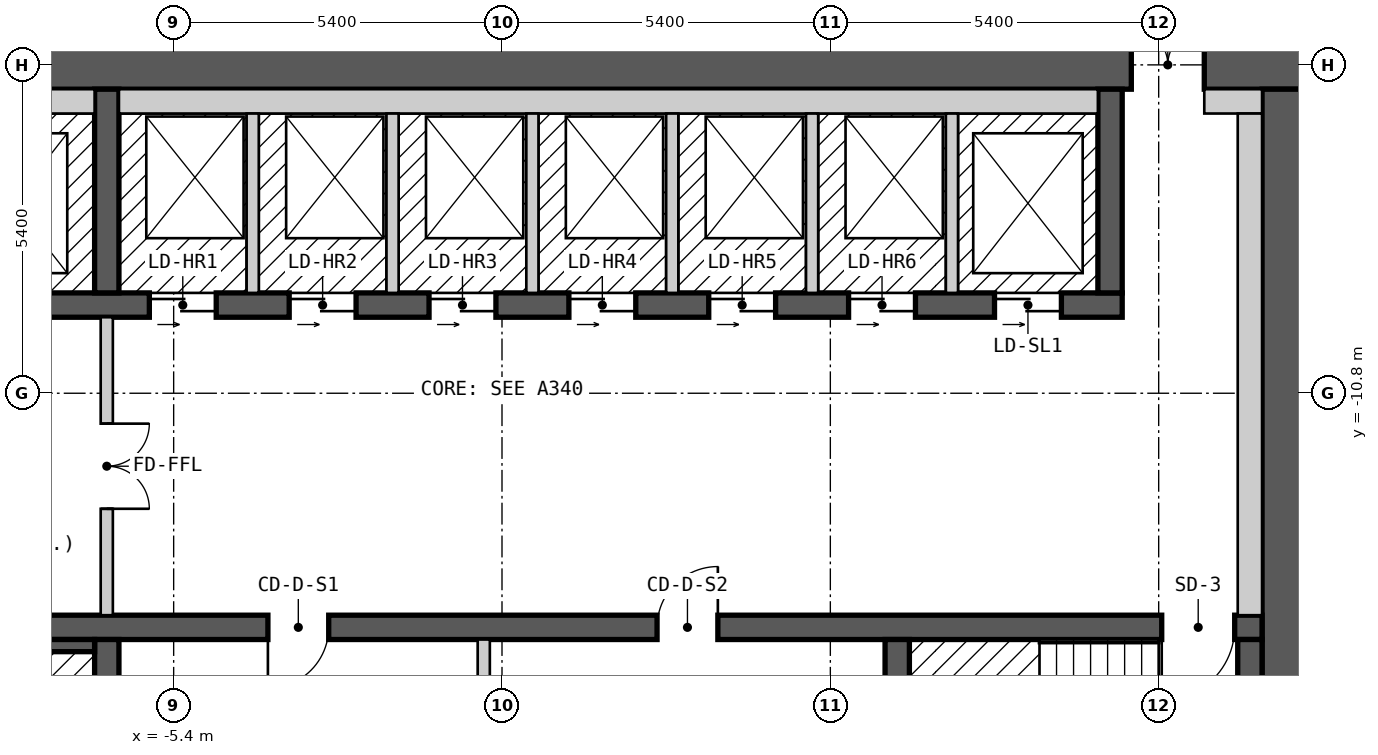
"""IFC4 building model, lengths in metres.
Left out: names, types, materials, properties, quantities, classifications, styles, units other than length and angle.
Written with IfcOpenShell. Run it as: python <this file> out.ifc"""

import sys

from ifc_helpers import new_model, si_unit, direction, frame, frame_2d, origin, place, context, subcontext, project, spatial, rectangle, extrude, element, fill, save


model = new_model("IFC4")
c1 = context("Model", 3, precision=1e-05, world=origin(), true_north=direction((0.0, 1.0)))
c2 = subcontext(c1, "Body", "Model", "MODEL_VIEW")
j1 = project(units=[si_unit("LENGTHUNIT", "METRE"), si_unit("PLANEANGLEUNIT", "RADIAN")], contexts=[c1])
p1 = place(None, origin())
s1 = spatial("IfcSite", under=j1, at=p1, CompositionType="ELEMENT")
p2 = place(p1, origin())
s2 = spatial("IfcBuilding", under=s1, at=p2, CompositionType="ELEMENT")
p3 = place(p2, frame((0.0, 0.0, 147.6)))
s3 = spatial("IfcBuildingStorey", under=s2, at=p3, CompositionType="ELEMENT", Elevation=147.6)
p4 = place(p3, frame((-13.3, -5.4, 0.0), z_axis=(0.0, 0.0, 1.0), x_axis=(1.0, 0.0, 0.0)))
e1 = element("IfcWall", 1, at=p4, inside=s3, PredefinedType="SHEAR", context=c2, shape_type="SweptSolid", body=[
    extrude(rectangle(XDim=26.6, YDim=0.8, at=frame_2d((13.3, 0.0))), origin(), (0.0, 0.0, 1.0), 2.7),
])
p5 = place(p4, frame((23.65, 0.0, 0.0)))
e2 = element("IfcOpeningElement", 2, at=p5, cuts=e1, PredefinedType="OPENING", context=c2, shape_type="SweptSolid", body=[
    extrude(rectangle(XDim=1.2, YDim=2.1, at=frame_2d((0.6, 1.05))), frame((0.0, 0.41, 0.0), z_axis=(0.0, -1.0, 0.0), x_axis=(1.0, 0.0, 0.0)), (0.0, 0.0, 1.0), 0.82),
])
p6 = place(p3, frame((12.9, -18.2, 0.0), z_axis=(0.0, 0.0, 1.0), x_axis=(0.0, 1.0, 0.0)))
e3 = element("IfcWall", 3, at=p6, inside=s3, PredefinedType="SHEAR", context=c2, shape_type="SweptSolid", body=[
    extrude(rectangle(XDim=12.4, YDim=0.8, at=frame_2d((6.2, 0.0))), origin(), (0.0, 0.0, 1.0), 2.7),
])
p7 = place(p3, frame((-12.5, -14.65, 0.0), z_axis=(0.0, 0.0, 1.0), x_axis=(1.0, 0.0, 0.0)))
e4 = element("IfcWall", 4, at=p7, inside=s3, PredefinedType="SHEAR", context=c2, shape_type="SweptSolid", body=[
    extrude(rectangle(XDim=25.0, YDim=0.4, at=frame_2d((12.5, 0.0))), origin(), (0.0, 0.0, 1.0), 2.7),
])
p8 = place(p7, frame((1.7, 0.0, 0.0), z_axis=(0.0, 0.0, 1.0), x_axis=(-1.0, 0.0, 0.0)))
e5 = element("IfcOpeningElement", 5, at=p8, cuts=e4, PredefinedType="OPENING", context=c2, shape_type="SweptSolid", body=[
    extrude(rectangle(XDim=1.2, YDim=2.1, at=frame_2d((0.6, 1.05))), frame((0.0, 0.21, 0.0), z_axis=(0.0, -1.0, 0.0), x_axis=(1.0, 0.0, 0.0)), (0.0, 0.0, 1.0), 0.42),
])
p9 = place(p7, frame((24.55, 0.0, 0.0), z_axis=(0.0, 0.0, 1.0), x_axis=(-1.0, 0.0, 0.0)))
e6 = element("IfcOpeningElement", 6, at=p9, cuts=e4, PredefinedType="OPENING", context=c2, shape_type="SweptSolid", body=[
    extrude(rectangle(XDim=1.2, YDim=2.1, at=frame_2d((0.6, 1.05))), frame((0.0, 0.21, 0.0), z_axis=(0.0, -1.0, 0.0), x_axis=(1.0, 0.0, 0.0)), (0.0, 0.0, 1.0), 0.42),
])
p10 = place(p7, frame((9.65, 0.0, 0.0), z_axis=(0.0, 0.0, 1.0), x_axis=(-1.0, 0.0, 0.0)))
e7 = element("IfcOpeningElement", 7, at=p10, cuts=e4, PredefinedType="OPENING", context=c2, shape_type="SweptSolid", body=[
    extrude(rectangle(XDim=1.0, YDim=2.1, at=frame_2d((0.5, 1.05))), frame((0.0, 0.21, 0.0), z_axis=(0.0, -1.0, 0.0), x_axis=(1.0, 0.0, 0.0)), (0.0, 0.0, 1.0), 0.42),
])
p11 = place(p7, frame((16.05, 0.0, 0.0), z_axis=(0.0, 0.0, 1.0), x_axis=(-1.0, 0.0, 0.0)))
e8 = element("IfcOpeningElement", 8, at=p11, cuts=e4, PredefinedType="OPENING", context=c2, shape_type="SweptSolid", body=[
    extrude(rectangle(XDim=1.0, YDim=2.1, at=frame_2d((0.5, 1.05))), frame((0.0, 0.21, 0.0), z_axis=(0.0, -1.0, 0.0), x_axis=(1.0, 0.0, 0.0)), (0.0, 0.0, 1.0), 0.42),
])
p12 = place(p3, frame((-12.5, -9.35, 0.0), z_axis=(0.0, 0.0, 1.0), x_axis=(1.0, 0.0, 0.0)))
e9 = element("IfcWall", 9, at=p12, inside=s3, PredefinedType="SHEAR", context=c2, shape_type="SweptSolid", body=[
    extrude(rectangle(XDim=22.7, YDim=0.4, at=frame_2d((11.35, 0.0))), origin(), (0.0, 0.0, 1.0), 2.7),
])
p13 = place(p12, frame((1.1, 0.0, 0.0)))
e10 = element("IfcOpeningElement", 10, at=p13, cuts=e9, PredefinedType="OPENING", context=c2, shape_type="SweptSolid", body=[
    extrude(rectangle(XDim=1.1, YDim=2.1, at=frame_2d((0.55, 1.05))), frame((0.0, 0.21, 0.0), z_axis=(0.0, -1.0, 0.0), x_axis=(1.0, 0.0, 0.0)), (0.0, 0.0, 1.0), 0.42),
])
p14 = place(p12, frame((3.9, 0.0, 0.0)))
e11 = element("IfcOpeningElement", 11, at=p14, cuts=e9, PredefinedType="OPENING", context=c2, shape_type="SweptSolid", body=[
    extrude(rectangle(XDim=1.1, YDim=2.1, at=frame_2d((0.55, 1.05))), frame((0.0, 0.21, 0.0), z_axis=(0.0, -1.0, 0.0), x_axis=(1.0, 0.0, 0.0)), (0.0, 0.0, 1.0), 0.42),
])
p15 = place(p12, frame((6.7, 0.0, 0.0)))
e12 = element("IfcOpeningElement", 12, at=p15, cuts=e9, PredefinedType="OPENING", context=c2, shape_type="SweptSolid", body=[
    extrude(rectangle(XDim=1.1, YDim=2.1, at=frame_2d((0.55, 1.05))), frame((0.0, 0.21, 0.0), z_axis=(0.0, -1.0, 0.0), x_axis=(1.0, 0.0, 0.0)), (0.0, 0.0, 1.0), 0.42),
])
p16 = place(p12, frame((9.0, 0.0, 0.0)))
e13 = element("IfcOpeningElement", 13, at=p16, cuts=e9, PredefinedType="OPENING", context=c2, shape_type="SweptSolid", body=[
    extrude(rectangle(XDim=1.1, YDim=2.1, at=frame_2d((0.55, 1.05))), frame((0.0, 0.21, 0.0), z_axis=(0.0, -1.0, 0.0), x_axis=(1.0, 0.0, 0.0)), (0.0, 0.0, 1.0), 0.42),
])
p17 = place(p12, frame((11.3, 0.0, 0.0)))
e14 = element("IfcOpeningElement", 14, at=p17, cuts=e9, PredefinedType="OPENING", context=c2, shape_type="SweptSolid", body=[
    extrude(rectangle(XDim=1.1, YDim=2.1, at=frame_2d((0.55, 1.05))), frame((0.0, 0.21, 0.0), z_axis=(0.0, -1.0, 0.0), x_axis=(1.0, 0.0, 0.0)), (0.0, 0.0, 1.0), 0.42),
])
p18 = place(p12, frame((13.6, 0.0, 0.0)))
e15 = element("IfcOpeningElement", 15, at=p18, cuts=e9, PredefinedType="OPENING", context=c2, shape_type="SweptSolid", body=[
    extrude(rectangle(XDim=1.1, YDim=2.1, at=frame_2d((0.55, 1.05))), frame((0.0, 0.21, 0.0), z_axis=(0.0, -1.0, 0.0), x_axis=(1.0, 0.0, 0.0)), (0.0, 0.0, 1.0), 0.42),
])
p19 = place(p12, frame((15.9, 0.0, 0.0)))
e16 = element("IfcOpeningElement", 16, at=p19, cuts=e9, PredefinedType="OPENING", context=c2, shape_type="SweptSolid", body=[
    extrude(rectangle(XDim=1.1, YDim=2.1, at=frame_2d((0.55, 1.05))), frame((0.0, 0.21, 0.0), z_axis=(0.0, -1.0, 0.0), x_axis=(1.0, 0.0, 0.0)), (0.0, 0.0, 1.0), 0.42),
])
p20 = place(p12, frame((18.2, 0.0, 0.0)))
e17 = element("IfcOpeningElement", 17, at=p20, cuts=e9, PredefinedType="OPENING", context=c2, shape_type="SweptSolid", body=[
    extrude(rectangle(XDim=1.1, YDim=2.1, at=frame_2d((0.55, 1.05))), frame((0.0, 0.21, 0.0), z_axis=(0.0, -1.0, 0.0), x_axis=(1.0, 0.0, 0.0)), (0.0, 0.0, 1.0), 0.42),
])
p21 = place(p12, frame((20.6, 0.0, 0.0)))
e18 = element("IfcOpeningElement", 18, at=p21, cuts=e9, PredefinedType="OPENING", context=c2, shape_type="SweptSolid", body=[
    extrude(rectangle(XDim=1.1, YDim=2.1, at=frame_2d((0.55, 1.05))), frame((0.0, 0.21, 0.0), z_axis=(0.0, -1.0, 0.0), x_axis=(1.0, 0.0, 0.0)), (0.0, 0.0, 1.0), 0.42),
])
for number, where, z_axis, x_axis in (
    (19, (-6.5, -18.2, 0.0), (0.0, 0.0, 1.0), (0.0, 1.0, 0.0)),
    (20, (6.5, -18.2, 0.0), (0.0, 0.0, 1.0), (0.0, 1.0, 0.0)),
    (21, (-6.5, -9.15, 0.0), (0.0, 0.0, 1.0), (0.0, 1.0, 0.0)),
    (22, (10.0, -9.15, 0.0), (0.0, 0.0, 1.0), (0.0, 1.0, 0.0)),
):
    element("IfcWall", number, at=place(p3, frame(where, z_axis=z_axis, x_axis=x_axis)), inside=s3, PredefinedType="SHEAR", context=c2, shape_type="SweptSolid", body=[
        extrude(rectangle(XDim=3.35, YDim=0.4, at=frame_2d((1.675, 0.0))), origin(), (0.0, 0.0, 1.0), 2.7),
    ])
p22 = place(p3, frame((-12.1, -6.0, 0.0), z_axis=(0.0, 0.0, 1.0), x_axis=(1.0, 0.0, 0.0)))
e23 = element("IfcWall", 23, at=p22, inside=s3, PredefinedType="SOLIDWALL", context=c2, shape_type="SweptSolid", body=[
    extrude(rectangle(XDim=5.4, YDim=0.4, at=frame_2d((2.7, 0.0))), origin(), (0.0, 0.0, 1.0), 2.7),
])
p23 = place(p3, frame((-10.8, -14.95, 0.0), z_axis=(0.0, 0.0, 1.0), x_axis=(1.0, 0.0, 0.0)))
e24 = element("IfcWall", 24, at=p23, inside=s3, PredefinedType="SOLIDWALL", context=c2, shape_type="SweptSolid", body=[
    extrude(rectangle(XDim=4.1, YDim=0.2, at=frame_2d((2.05, 0.0))), origin(), (0.0, 0.0, 1.0), 2.7),
])
p24 = place(p3, frame((-6.5, -14.45, 0.0), z_axis=(0.0, 0.0, 1.0), x_axis=(0.0, 1.0, 0.0)))
e25 = element("IfcWall", 25, at=p24, inside=s3, PredefinedType="PARTITIONING", context=c2, shape_type="SweptSolid", body=[
    extrude(rectangle(XDim=4.9, YDim=0.2, at=frame_2d((2.45, 0.0))), origin(), (0.0, 0.0, 1.0), 2.7),
])
p25 = place(p24, frame((3.15, 0.0, 0.0), z_axis=(0.0, 0.0, 1.0), x_axis=(-1.0, 0.0, 0.0)))
e26 = element("IfcOpeningElement", 26, at=p25, cuts=e25, PredefinedType="OPENING", context=c2, shape_type="SweptSolid", body=[
    extrude(rectangle(XDim=1.4, YDim=2.1, at=frame_2d((0.7, 1.05))), frame((0.0, 0.11, 0.0), z_axis=(0.0, -1.0, 0.0), x_axis=(1.0, 0.0, 0.0)), (0.0, 0.0, 1.0), 0.22),
])
p26 = place(p3, frame((-6.3, -6.0, 0.0), z_axis=(0.0, 0.0, 1.0), x_axis=(1.0, 0.0, 0.0)))
e27 = element("IfcWall", 27, at=p26, inside=s3, PredefinedType="SOLIDWALL", context=c2, shape_type="SweptSolid", body=[
    extrude(rectangle(XDim=16.1, YDim=0.4, at=frame_2d((8.05, 0.0))), origin(), (0.0, 0.0, 1.0), 2.7),
])
for number, where, z_axis, x_axis in (
    (28, (-4.1, -9.15, 0.0), (0.0, 0.0, 1.0), (0.0, 1.0, 0.0)),
    (29, (-1.8, -9.15, 0.0), (0.0, 0.0, 1.0), (0.0, 1.0, 0.0)),
):
    element("IfcWall", number, at=place(p3, frame(where, z_axis=z_axis, x_axis=x_axis)), inside=s3, PredefinedType="SOLIDWALL", context=c2, shape_type="SweptSolid", body=[
        extrude(rectangle(XDim=2.95, YDim=0.2, at=frame_2d((1.475, 0.0))), origin(), (0.0, 0.0, 1.0), 2.7),
    ])
p27 = place(p3, frame((-0.3, -17.8, 0.0), z_axis=(0.0, 0.0, 1.0), x_axis=(0.0, 1.0, 0.0)))
e30 = element("IfcWall", 30, at=p27, inside=s3, PredefinedType="PARTITIONING", context=c2, shape_type="SweptSolid", body=[
    extrude(rectangle(XDim=2.95, YDim=0.2, at=frame_2d((1.475, 0.0))), origin(), (0.0, 0.0, 1.0), 2.7),
])
for number, where, z_axis, x_axis in (
    (31, (0.5, -9.15, 0.0), (0.0, 0.0, 1.0), (0.0, 1.0, 0.0)),
    (32, (2.8, -9.15, 0.0), (0.0, 0.0, 1.0), (0.0, 1.0, 0.0)),
    (33, (5.1, -9.15, 0.0), (0.0, 0.0, 1.0), (0.0, 1.0, 0.0)),
    (34, (7.4, -9.15, 0.0), (0.0, 0.0, 1.0), (0.0, 1.0, 0.0)),
):
    element("IfcWall", number, at=place(p3, frame(where, z_axis=z_axis, x_axis=x_axis)), inside=s3, PredefinedType="SOLIDWALL", context=c2, shape_type="SweptSolid", body=[
        extrude(rectangle(XDim=2.95, YDim=0.2, at=frame_2d((1.475, 0.0))), origin(), (0.0, 0.0, 1.0), 2.7),
    ])
p28 = place(p3, frame((11.55, -6.0, 0.0), z_axis=(0.0, 0.0, 1.0), x_axis=(1.0, 0.0, 0.0)))
e35 = element("IfcWall", 35, at=p28, inside=s3, PredefinedType="PARTITIONING", context=c2, shape_type="SweptSolid", body=[
    extrude(rectangle(XDim=0.95, YDim=0.4, at=frame_2d((0.475, 0.0))), origin(), (0.0, 0.0, 1.0), 2.7),
])
p29 = place(p3, frame((12.3, -17.6, 0.0), z_axis=(0.0, 0.0, 1.0), x_axis=(0.0, 1.0, 0.0)))
e36 = element("IfcWall", 36, at=p29, inside=s3, PredefinedType="SOLIDWALL", context=c2, shape_type="SweptSolid", body=[
    extrude(rectangle(XDim=2.75, YDim=0.4, at=frame_2d((1.375, 0.0))), origin(), (0.0, 0.0, 1.0), 2.7),
])
p30 = place(p3, frame((12.3, -14.45, 0.0), z_axis=(0.0, 0.0, 1.0), x_axis=(0.0, 1.0, 0.0)))
e37 = element("IfcWall", 37, at=p30, inside=s3, PredefinedType="PARTITIONING", context=c2, shape_type="SweptSolid", body=[
    extrude(rectangle(XDim=8.25, YDim=0.4, at=frame_2d((4.125, 0.0))), origin(), (0.0, 0.0, 1.0), 2.7),
])
p31 = place(p15, origin())
e38 = element("IfcDoor", 38, at=p31, inside=s3, OperationType="DOUBLE_DOOR_SLIDING", PredefinedType="DOOR", context=c2, shape_type="SweptSolid", body=[
    extrude(rectangle(XDim=1.1, YDim=2.1, at=frame_2d((0.55, 1.05))), frame((0.0, 0.025, 0.0), z_axis=(0.0, -1.0, 0.0), x_axis=(1.0, 0.0, 0.0)), (0.0, 0.0, 1.0), 0.05),
])
fill(e12, e38)
p32 = place(p16, origin())
e39 = element("IfcDoor", 39, at=p32, inside=s3, OperationType="DOUBLE_DOOR_SLIDING", PredefinedType="DOOR", context=c2, shape_type="SweptSolid", body=[
    extrude(rectangle(XDim=1.1, YDim=2.1, at=frame_2d((0.55, 1.05))), frame((0.0, 0.025, 0.0), z_axis=(0.0, -1.0, 0.0), x_axis=(1.0, 0.0, 0.0)), (0.0, 0.0, 1.0), 0.05),
])
fill(e13, e39)
p33 = place(p17, origin())
e40 = element("IfcDoor", 40, at=p33, inside=s3, OperationType="DOUBLE_DOOR_SLIDING", PredefinedType="DOOR", context=c2, shape_type="SweptSolid", body=[
    extrude(rectangle(XDim=1.1, YDim=2.1, at=frame_2d((0.55, 1.05))), frame((0.0, 0.025, 0.0), z_axis=(0.0, -1.0, 0.0), x_axis=(1.0, 0.0, 0.0)), (0.0, 0.0, 1.0), 0.05),
])
fill(e14, e40)
p34 = place(p18, origin())
e41 = element("IfcDoor", 41, at=p34, inside=s3, OperationType="DOUBLE_DOOR_SLIDING", PredefinedType="DOOR", context=c2, shape_type="SweptSolid", body=[
    extrude(rectangle(XDim=1.1, YDim=2.1, at=frame_2d((0.55, 1.05))), frame((0.0, 0.025, 0.0), z_axis=(0.0, -1.0, 0.0), x_axis=(1.0, 0.0, 0.0)), (0.0, 0.0, 1.0), 0.05),
])
fill(e15, e41)
p35 = place(p19, origin())
e42 = element("IfcDoor", 42, at=p35, inside=s3, OperationType="DOUBLE_DOOR_SLIDING", PredefinedType="DOOR", context=c2, shape_type="SweptSolid", body=[
    extrude(rectangle(XDim=1.1, YDim=2.1, at=frame_2d((0.55, 1.05))), frame((0.0, 0.025, 0.0), z_axis=(0.0, -1.0, 0.0), x_axis=(1.0, 0.0, 0.0)), (0.0, 0.0, 1.0), 0.05),
])
fill(e16, e42)
p36 = place(p20, origin())
e43 = element("IfcDoor", 43, at=p36, inside=s3, OperationType="DOUBLE_DOOR_SLIDING", PredefinedType="DOOR", context=c2, shape_type="SweptSolid", body=[
    extrude(rectangle(XDim=1.1, YDim=2.1, at=frame_2d((0.55, 1.05))), frame((0.0, 0.025, 0.0), z_axis=(0.0, -1.0, 0.0), x_axis=(1.0, 0.0, 0.0)), (0.0, 0.0, 1.0), 0.05),
])
fill(e17, e43)
p37 = place(p21, origin())
e44 = element("IfcDoor", 44, at=p37, inside=s3, OperationType="DOUBLE_DOOR_SLIDING", PredefinedType="DOOR", context=c2, shape_type="SweptSolid", body=[
    extrude(rectangle(XDim=1.1, YDim=2.1, at=frame_2d((0.55, 1.05))), frame((0.0, 0.025, 0.0), z_axis=(0.0, -1.0, 0.0), x_axis=(1.0, 0.0, 0.0)), (0.0, 0.0, 1.0), 0.05),
])
fill(e18, e44)
p38 = place(p9, origin())
e45 = element("IfcDoor", 45, at=p38, inside=s3, OperationType="SINGLE_SWING_RIGHT", PredefinedType="DOOR", context=c2, shape_type="SweptSolid", body=[
    extrude(rectangle(XDim=1.2, YDim=2.1, at=frame_2d((0.6, 1.05))), frame((0.0, 0.025, 0.0), z_axis=(0.0, -1.0, 0.0), x_axis=(1.0, 0.0, 0.0)), (0.0, 0.0, 1.0), 0.05),
])
fill(e6, e45)
p39 = place(p25, origin())
e46 = element("IfcDoor", 46, at=p39, inside=s3, OperationType="DOUBLE_DOOR_SINGLE_SWING", PredefinedType="DOOR", context=c2, shape_type="SweptSolid", body=[
    extrude(rectangle(XDim=1.4, YDim=2.1, at=frame_2d((0.7, 1.05))), frame((0.0, 0.025, 0.0), z_axis=(0.0, -1.0, 0.0), x_axis=(1.0, 0.0, 0.0)), (0.0, 0.0, 1.0), 0.05),
])
fill(e26, e46)
p40 = place(p5, origin())
e47 = element("IfcDoor", 47, at=p40, inside=s3, OperationType="DOUBLE_DOOR_SINGLE_SWING", PredefinedType="DOOR", context=c2, shape_type="SweptSolid", body=[
    extrude(rectangle(XDim=1.2, YDim=2.1, at=frame_2d((0.6, 1.05))), frame((0.0, 0.025, 0.0), z_axis=(0.0, -1.0, 0.0), x_axis=(1.0, 0.0, 0.0)), (0.0, 0.0, 1.0), 0.05),
])
fill(e2, e47)
p41 = place(p10, origin())
e48 = element("IfcDoor", 48, at=p41, inside=s3, OperationType="SINGLE_SWING_RIGHT", PredefinedType="DOOR", context=c2, shape_type="SweptSolid", body=[
    extrude(rectangle(XDim=1.0, YDim=2.1, at=frame_2d((0.5, 1.05))), frame((0.0, 0.025, 0.0), z_axis=(0.0, -1.0, 0.0), x_axis=(1.0, 0.0, 0.0)), (0.0, 0.0, 1.0), 0.05),
])
fill(e7, e48)
p42 = place(p11, origin())
e49 = element("IfcDoor", 49, at=p42, inside=s3, OperationType="SINGLE_SWING_LEFT", PredefinedType="DOOR", context=c2, shape_type="SweptSolid", body=[
    extrude(rectangle(XDim=1.0, YDim=2.1, at=frame_2d((0.5, 1.05))), frame((0.0, 0.025, 0.0), z_axis=(0.0, -1.0, 0.0), x_axis=(1.0, 0.0, 0.0)), (0.0, 0.0, 1.0), 0.05),
])
fill(e8, e49)
save(model, sys.argv[1])
